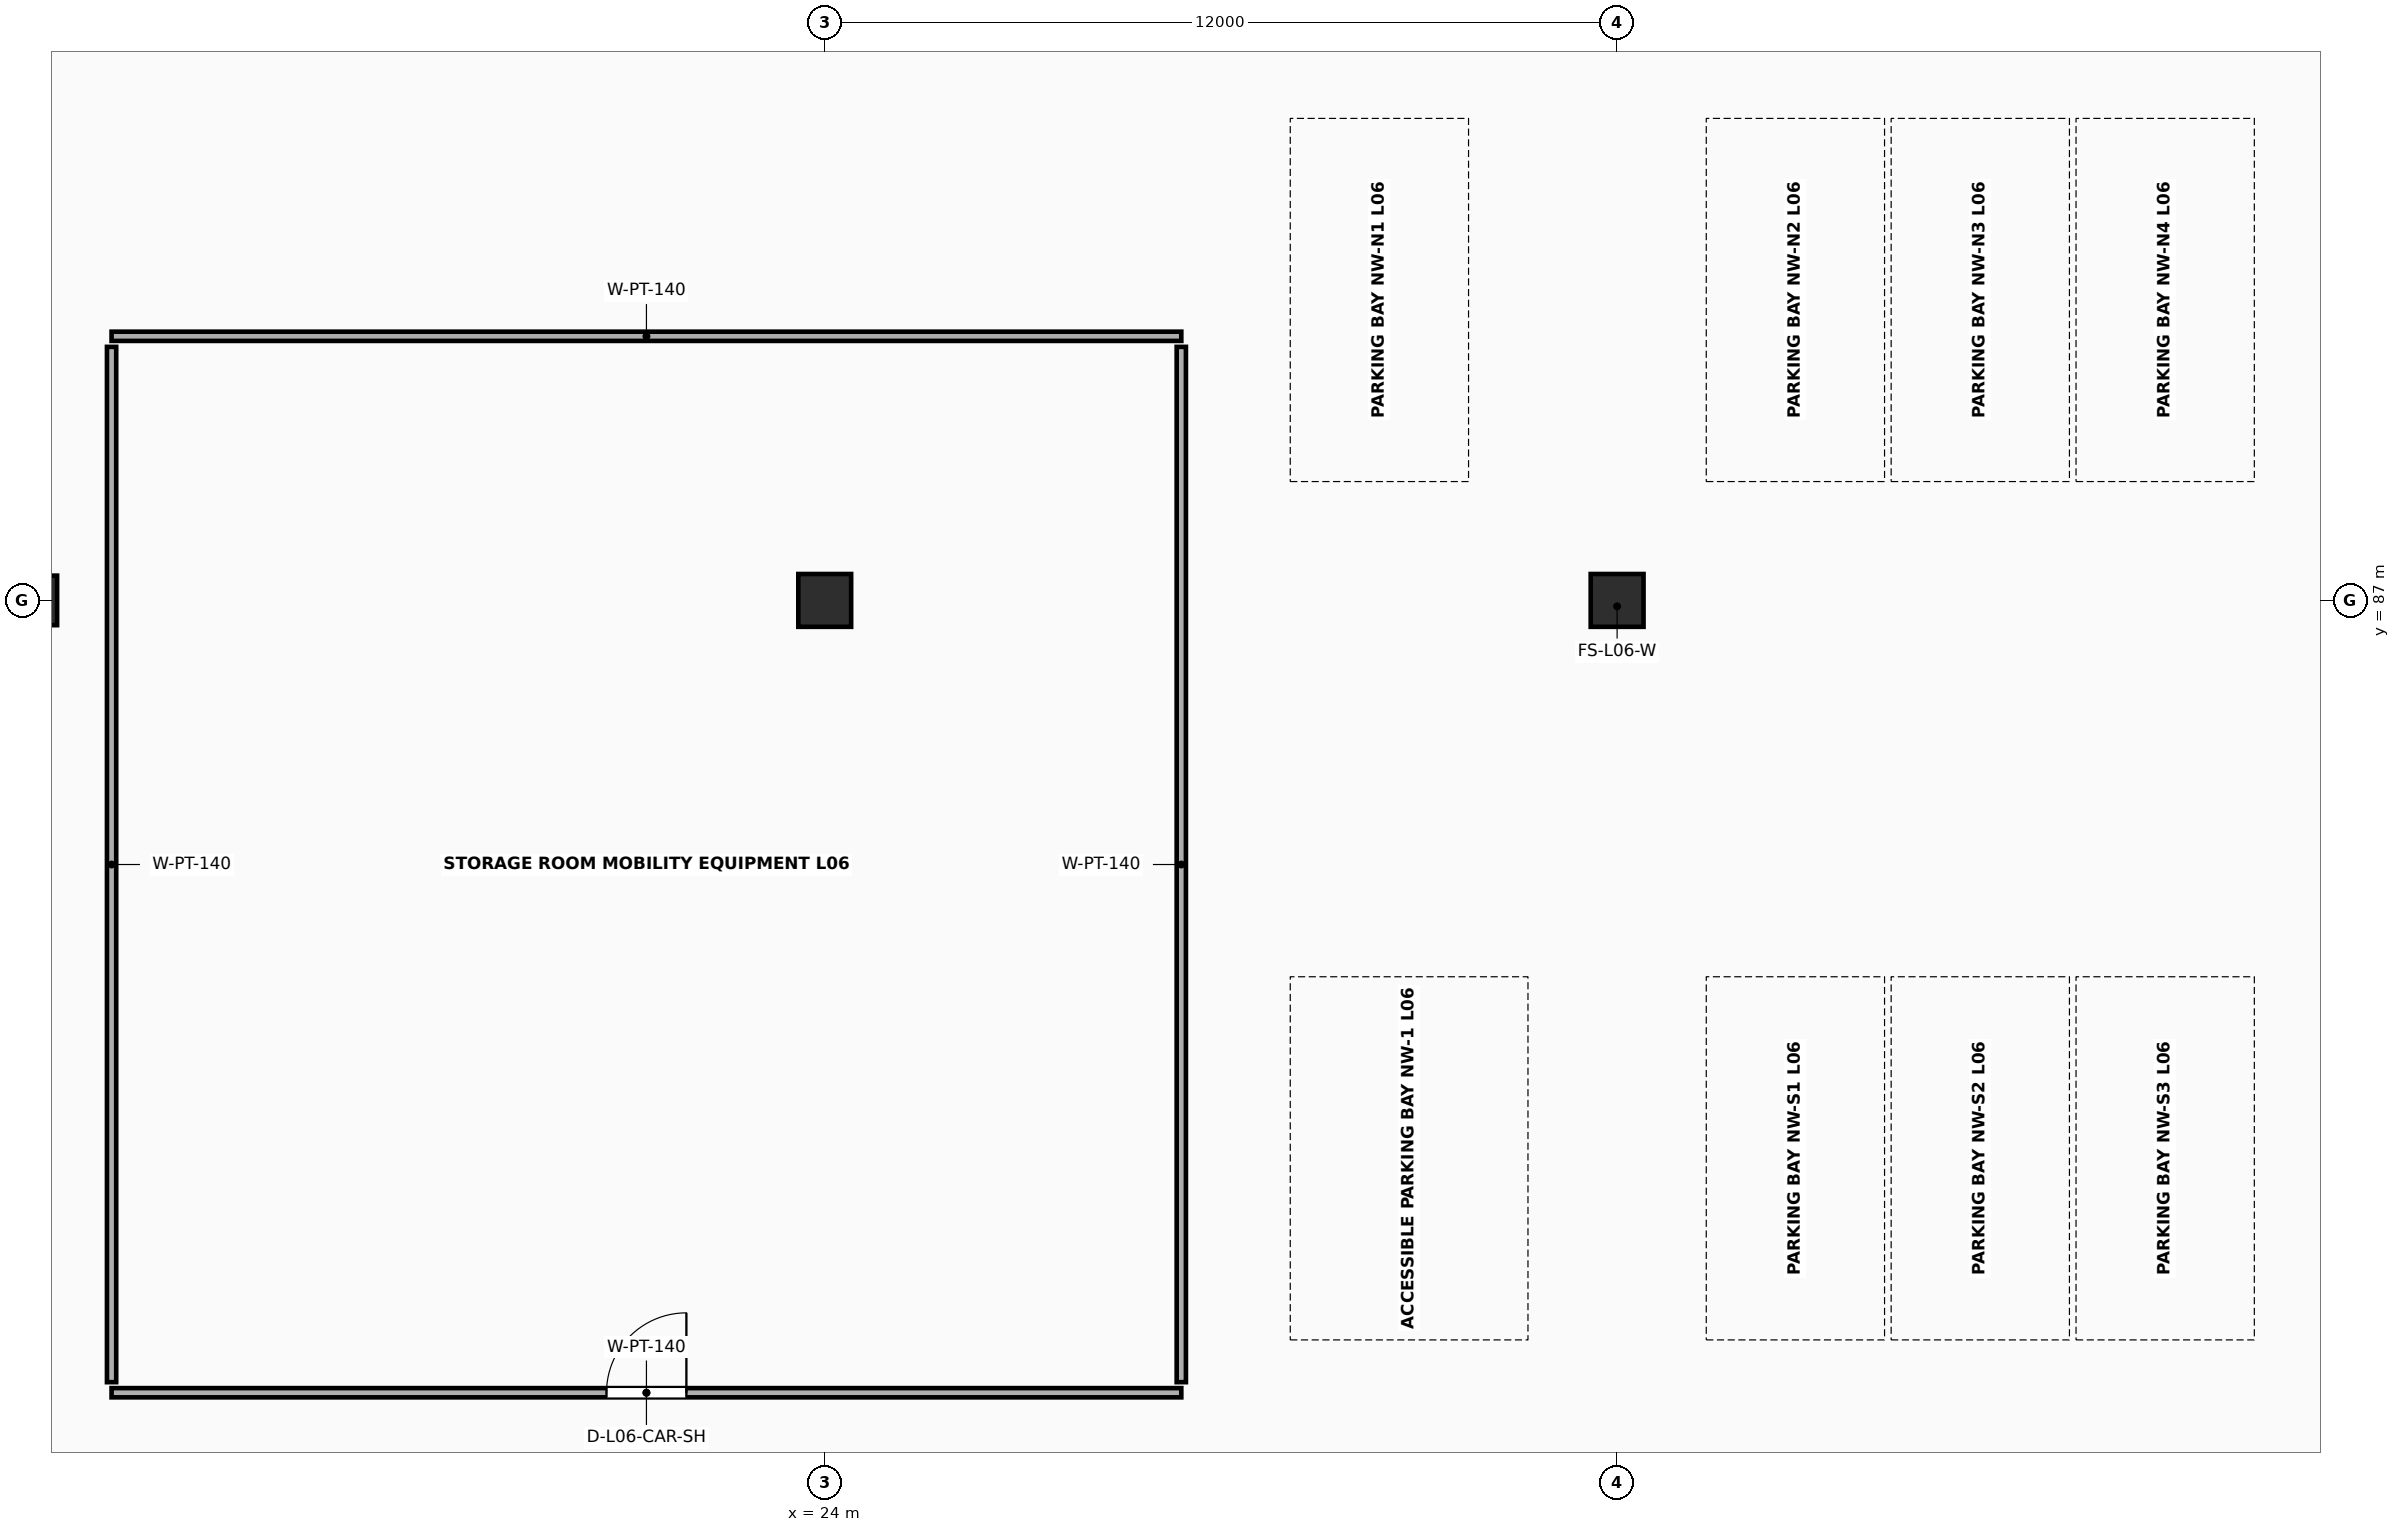
"""IFC4 building model, lengths in metres.
Left out: names, types, materials, properties, quantities, classifications, styles, units other than length and angle.
Written with IfcOpenShell. Run it as: python <this file> out.ifc"""

import sys

from ifc_helpers import new_model, si_unit, direction, frame, frame_2d, origin, origin_2d, place, context, subcontext, project, spatial, rectangle, extrude, element, fill, save


model = new_model("IFC4")
c1 = context("Model", 3, precision=1e-05, world=origin(), true_north=direction((0.0, 1.0)))
c2 = subcontext(c1, "Body", "Model", "MODEL_VIEW")
j1 = project(units=[si_unit("LENGTHUNIT", "METRE"), si_unit("PLANEANGLEUNIT", "RADIAN")], contexts=[c1])
p1 = place(None, origin())
s1 = spatial("IfcSite", under=j1, at=p1, CompositionType="ELEMENT")
p2 = place(p1, origin())
s2 = spatial("IfcBuilding", under=s1, at=p2, CompositionType="ELEMENT")
p3 = place(p2, frame((0.0, 0.0, 24.8)))
s3 = spatial("IfcBuildingStorey", under=s2, at=p3, CompositionType="ELEMENT", Elevation=24.8)
p4 = place(p3, frame((12.0, 87.0, 0.0), z_axis=(0.0, 0.0, 1.0), x_axis=(1.0, 0.0, 0.0)))
e1 = element("IfcColumn", 1, at=p4, inside=s3, PredefinedType="COLUMN", context=c2, shape_type="SweptSolid", body=[
    extrude(rectangle(XDim=0.75, YDim=0.75, at=origin_2d()), origin(), (0.0, 0.0, 1.0), 3.8),
])
for number, where, z_axis, x_axis in (
    (2, (24.0, 87.0, 0.0), (0.0, 0.0, 1.0), (1.0, 0.0, 0.0)),
    (3, (36.0, 87.0, 0.0), (0.0, 0.0, 1.0), (1.0, 0.0, 0.0)),
):
    element("IfcColumn", number, at=place(p3, frame(where, z_axis=z_axis, x_axis=x_axis)), inside=s3, PredefinedType="COLUMN", context=c2, shape_type="SweptSolid", body=[
        extrude(rectangle(XDim=0.8, YDim=0.8, at=origin_2d()), origin(), (0.0, 0.0, 1.0), 3.8),
    ])
p5 = place(p3, frame((13.2, 75.0, 0.0), z_axis=(0.0, 0.0, 1.0), x_axis=(1.0, 0.0, 0.0)))
e4 = element("IfcWall", 4, at=p5, inside=s3, PredefinedType="PARTITIONING", context=c2, shape_type="SweptSolid", body=[
    extrude(rectangle(XDim=16.2, YDim=0.14, at=frame_2d((8.1, 0.0))), origin(), (0.0, 0.0, 1.0), 2.75),
])
p6 = place(p5, frame((7.495, 0.0, 0.0)))
e5 = element("IfcOpeningElement", 5, at=p6, cuts=e4, PredefinedType="OPENING", context=c2, shape_type="SweptSolid", body=[
    extrude(rectangle(XDim=1.21, YDim=2.25, at=frame_2d((0.605, 1.125))), frame((0.0, 0.085, 0.0), z_axis=(0.0, -1.0, 0.0), x_axis=(1.0, 0.0, 0.0)), (0.0, 0.0, 1.0), 0.17),
])
p7 = place(p3, frame((13.2, 91.0, 0.0), z_axis=(0.0, 0.0, 1.0), x_axis=(1.0, 0.0, 0.0)))
e6 = element("IfcWall", 6, at=p7, inside=s3, PredefinedType="PARTITIONING", context=c2, shape_type="SweptSolid", body=[
    extrude(rectangle(XDim=16.2, YDim=0.14, at=frame_2d((8.1, 0.0))), origin(), (0.0, 0.0, 1.0), 2.75),
])
for number, where, z_axis, x_axis in (
    (7, (13.2, 75.16, 0.0), (0.0, 0.0, 1.0), (0.0, 1.0, 0.0)),
    (8, (29.4, 75.16, 0.0), (0.0, 0.0, 1.0), (0.0, 1.0, 0.0)),
):
    element("IfcWall", number, at=place(p3, frame(where, z_axis=z_axis, x_axis=x_axis)), inside=s3, PredefinedType="PARTITIONING", context=c2, shape_type="SweptSolid", body=[
        extrude(rectangle(XDim=15.68, YDim=0.14, at=frame_2d((7.84, 0.0))), origin(), (0.0, 0.0, 1.0), 2.75),
    ])
p8 = place(p6, origin())
e9 = element("IfcDoor", 9, at=p8, inside=s3, OperationType="SINGLE_SWING_RIGHT", PredefinedType="DOOR", context=c2, shape_type="SweptSolid", body=[
    extrude(rectangle(XDim=1.21, YDim=2.25, at=frame_2d((0.605, 1.125))), frame((0.0, 0.025, 0.0), z_axis=(0.0, -1.0, 0.0), x_axis=(1.0, 0.0, 0.0)), (0.0, 0.0, 1.0), 0.05),
])
fill(e5, e9)
save(model, sys.argv[1])
